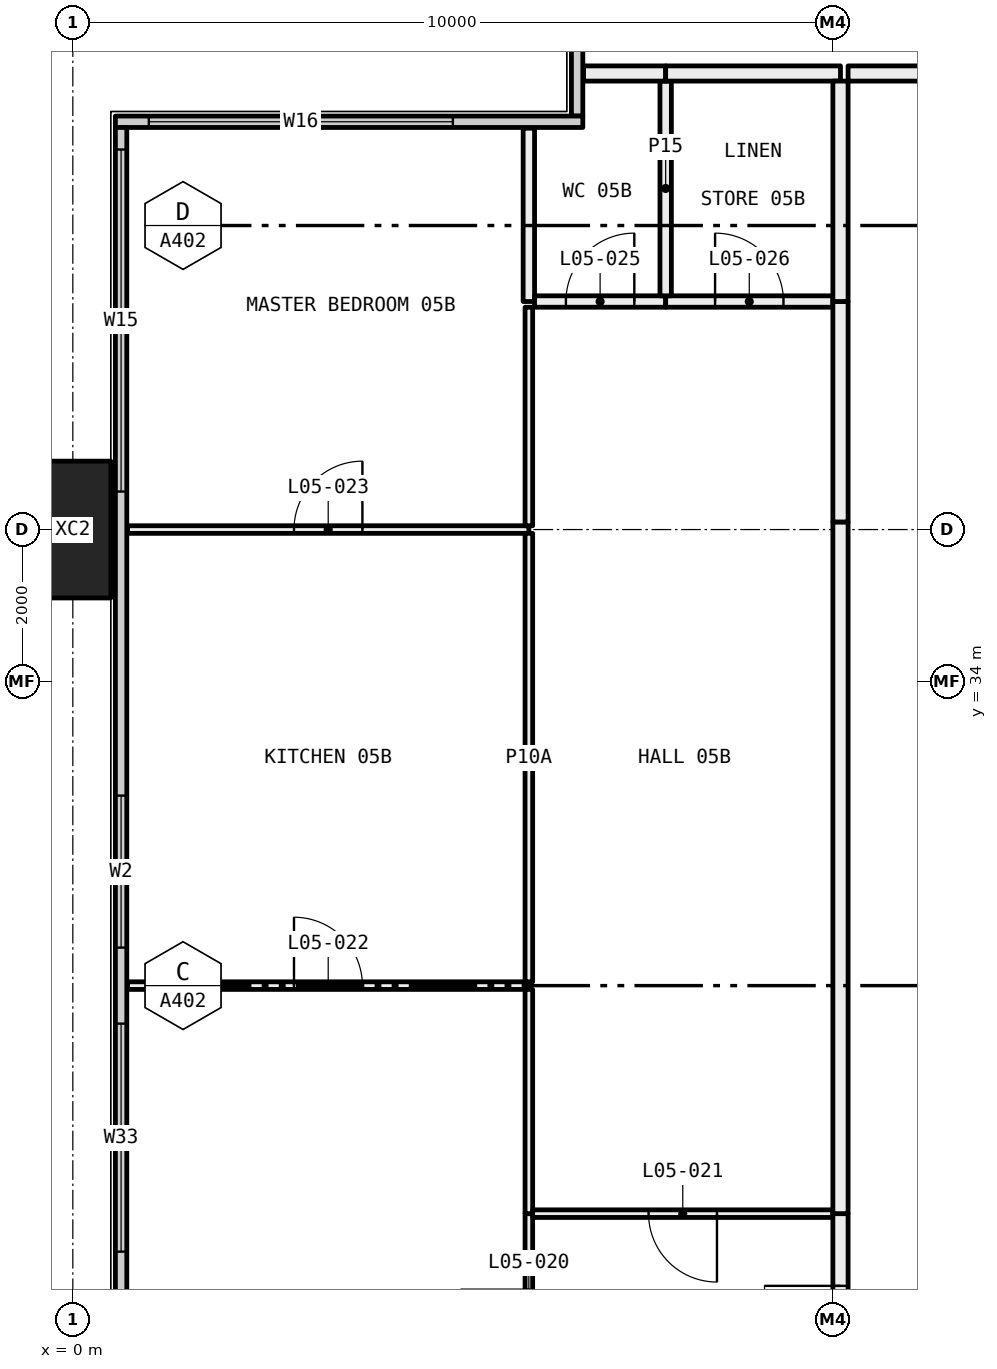
"""IFC4 building model, lengths in metres.
Left out: names, types, materials, properties, quantities, classifications, styles, units other than length and angle.
Written with IfcOpenShell. Run it as: python <this file> out.ifc"""

import sys

from ifc_helpers import new_model, si_unit, direction, frame, frame_2d, origin, origin_2d, place, context, subcontext, project, spatial, rectangle, hollow_rectangle, extrude, element, fill, save


model = new_model("IFC4")
c1 = context("Model", 3, precision=1e-05, world=origin(), true_north=direction((0.0, 1.0)))
c2 = subcontext(c1, "Body", "Model", "MODEL_VIEW")
j1 = project(units=[si_unit("LENGTHUNIT", "METRE"), si_unit("PLANEANGLEUNIT", "RADIAN")], contexts=[c1])
p1 = place(None, origin())
s1 = spatial("IfcSite", under=j1, at=p1, CompositionType="ELEMENT")
p2 = place(p1, origin())
s2 = spatial("IfcBuilding", under=s1, at=p2, CompositionType="ELEMENT")
p3 = place(p2, frame((0.0, 0.0, 30.0)))
s3 = spatial("IfcBuildingStorey", under=s2, at=p3, CompositionType="ELEMENT", Elevation=30.0)
p4 = place(p3, frame((0.0, 36.0, -0.4), z_axis=(0.0, 0.0, 1.0), x_axis=(0.0, 1.0, 0.0)))
e1 = element("IfcColumn", 1, at=p4, inside=s3, PredefinedType="COLUMN", context=c2, shape_type="SweptSolid", body=[
    extrude(hollow_rectangle(XDim=1.8, YDim=1.0, WallThickness=0.07, at=origin_2d()), origin(), (0.0, 0.0, 1.0), 3.45),
])
p5 = place(p3, frame((6.635, 41.44, 0.0), z_axis=(0.0, 0.0, 1.0), x_axis=(0.0, 1.0, 0.0)))
e2 = element("IfcWall", 2, at=p5, inside=s3, PredefinedType="ELEMENTEDWALL", context=c2, shape_type="SweptSolid", body=[
    extrude(rectangle(XDim=5.85, YDim=0.15, at=frame_2d((2.925, 0.0))), origin(), (0.0, 0.0, 1.0), 3.05),
])
p6 = place(p5, frame((1.56, 0.0, 0.45)))
e3 = element("IfcOpeningElement", 3, at=p6, cuts=e2, PredefinedType="OPENING", context=c2, shape_type="SweptSolid", body=[
    extrude(rectangle(XDim=4.0, YDim=2.55, at=frame_2d((2.0, 1.275))), frame((0.0, 0.085, 0.0), z_axis=(0.0, -1.0, 0.0), x_axis=(1.0, 0.0, 0.0)), (0.0, 0.0, 1.0), 0.17),
])
p7 = place(p3, frame((0.56, 41.365, 0.0), z_axis=(0.0, 0.0, 1.0), x_axis=(1.0, 0.0, 0.0)))
e4 = element("IfcWall", 4, at=p7, inside=s3, PredefinedType="ELEMENTEDWALL", context=c2, shape_type="SweptSolid", body=[
    extrude(rectangle(XDim=6.15, YDim=0.15, at=frame_2d((3.075, 0.0))), origin(), (0.0, 0.0, 1.0), 3.05),
])
p8 = place(p7, frame((0.44, 0.0, 0.45)))
e5 = element("IfcOpeningElement", 5, at=p8, cuts=e4, PredefinedType="OPENING", context=c2, shape_type="SweptSolid", body=[
    extrude(rectangle(XDim=4.0, YDim=2.55, at=frame_2d((2.0, 1.275))), frame((0.0, 0.085, 0.0), z_axis=(0.0, -1.0, 0.0), x_axis=(1.0, 0.0, 0.0)), (0.0, 0.0, 1.0), 0.17),
])
p9 = place(p3, frame((0.635, 6.71, 0.0), z_axis=(0.0, 0.0, 1.0), x_axis=(0.0, 1.0, 0.0)))
e6 = element("IfcWall", 6, at=p9, inside=s3, PredefinedType="ELEMENTEDWALL", context=c2, shape_type="SweptSolid", body=[
    extrude(rectangle(XDim=34.58, YDim=0.15, at=frame_2d((17.29, 0.0))), origin(), (0.0, 0.0, 1.0), 3.05),
])
p10 = place(p9, frame((0.29, 0.0, 0.45)))
e7 = element("IfcOpeningElement", 7, at=p10, cuts=e6, PredefinedType="OPENING", context=c2, shape_type="SweptSolid", body=[
    extrude(rectangle(XDim=4.5, YDim=2.55, at=frame_2d((2.25, 1.275))), frame((0.0, 0.085, 0.0), z_axis=(0.0, -1.0, 0.0), x_axis=(1.0, 0.0, 0.0)), (0.0, 0.0, 1.0), 0.17),
])
p11 = place(p9, frame((7.79, 0.0, 0.45)))
e8 = element("IfcOpeningElement", 8, at=p11, cuts=e6, PredefinedType="OPENING", context=c2, shape_type="SweptSolid", body=[
    extrude(rectangle(XDim=3.0, YDim=2.55, at=frame_2d((1.5, 1.275))), frame((0.0, 0.085, 0.0), z_axis=(0.0, -1.0, 0.0), x_axis=(1.0, 0.0, 0.0)), (0.0, 0.0, 1.0), 0.17),
])
p12 = place(p9, frame((11.79, 0.0, 0.45)))
e9 = element("IfcOpeningElement", 9, at=p12, cuts=e6, PredefinedType="OPENING", context=c2, shape_type="SweptSolid", body=[
    extrude(rectangle(XDim=3.0, YDim=2.55, at=frame_2d((1.5, 1.275))), frame((0.0, 0.085, 0.0), z_axis=(0.0, -1.0, 0.0), x_axis=(1.0, 0.0, 0.0)), (0.0, 0.0, 1.0), 0.17),
])
p13 = place(p9, frame((19.79, 0.0, 0.45)))
e10 = element("IfcOpeningElement", 10, at=p13, cuts=e6, PredefinedType="OPENING", context=c2, shape_type="SweptSolid", body=[
    extrude(rectangle(XDim=3.0, YDim=2.55, at=frame_2d((1.5, 1.275))), frame((0.0, 0.085, 0.0), z_axis=(0.0, -1.0, 0.0), x_axis=(1.0, 0.0, 0.0)), (0.0, 0.0, 1.0), 0.17),
])
p14 = place(p9, frame((23.79, 0.0, 0.45)))
e11 = element("IfcOpeningElement", 11, at=p14, cuts=e6, PredefinedType="OPENING", context=c2, shape_type="SweptSolid", body=[
    extrude(rectangle(XDim=2.0, YDim=2.55, at=frame_2d((1.0, 1.275))), frame((0.0, 0.085, 0.0), z_axis=(0.0, -1.0, 0.0), x_axis=(1.0, 0.0, 0.0)), (0.0, 0.0, 1.0), 0.17),
])
p15 = place(p9, frame((29.79, 0.0, 0.45)))
e12 = element("IfcOpeningElement", 12, at=p15, cuts=e6, PredefinedType="OPENING", context=c2, shape_type="SweptSolid", body=[
    extrude(rectangle(XDim=4.5, YDim=2.55, at=frame_2d((2.25, 1.275))), frame((0.0, 0.085, 0.0), z_axis=(0.0, -1.0, 0.0), x_axis=(1.0, 0.0, 0.0)), (0.0, 0.0, 1.0), 0.17),
])
p16 = place(p3, frame((6.0, 30.0, 0.0), z_axis=(0.0, 0.0, 1.0), x_axis=(-1.0, 0.0, 0.0)))
e13 = element("IfcWall", 13, at=p16, inside=s3, PredefinedType="PARTITIONING", context=c2, shape_type="SweptSolid", body=[
    extrude(rectangle(XDim=5.28, YDim=0.1, at=frame_2d((2.64, 0.0))), origin(), (0.0, 0.0, 1.0), 3.05),
])
p17 = place(p16, frame((2.19, 0.0, 0.0)))
e14 = element("IfcOpeningElement", 14, at=p17, cuts=e13, PredefinedType="OPENING", context=c2, shape_type="SweptSolid", body=[
    extrude(rectangle(XDim=0.9, YDim=2.1, at=frame_2d((0.45, 1.05))), frame((0.0, 0.06, 0.0), z_axis=(0.0, -1.0, 0.0), x_axis=(1.0, 0.0, 0.0)), (0.0, 0.0, 1.0), 0.12),
])
p18 = place(p3, frame((6.0, 24.1, 0.0), z_axis=(0.0, 0.0, 1.0), x_axis=(0.0, 1.0, 0.0)))
e15 = element("IfcWall", 15, at=p18, inside=s3, PredefinedType="PARTITIONING", context=c2, shape_type="SweptSolid", body=[
    extrude(rectangle(XDim=2.9, YDim=0.1, at=frame_2d((1.45, 0.0))), origin(), (0.0, 0.0, 1.0), 3.05),
])
p19 = place(p18, frame((1.0, 0.0, 0.0)))
e16 = element("IfcOpeningElement", 16, at=p19, cuts=e15, PredefinedType="OPENING", context=c2, shape_type="SweptSolid", body=[
    extrude(rectangle(XDim=0.9, YDim=2.1, at=frame_2d((0.45, 1.05))), frame((0.0, 0.06, 0.0), z_axis=(0.0, -1.0, 0.0), x_axis=(1.0, 0.0, 0.0)), (0.0, 0.0, 1.0), 0.12),
])
p20 = place(p3, frame((6.0, 27.0, 0.0), z_axis=(0.0, 0.0, 1.0), x_axis=(0.0, 1.0, 0.0)))
e17 = element("IfcWall", 17, at=p20, inside=s3, PredefinedType="PARTITIONING", context=c2, shape_type="SweptSolid", body=[
    extrude(rectangle(XDim=2.95, YDim=0.1, at=frame_2d((1.475, 0.0))), origin(), (0.0, 0.0, 1.0), 3.05),
])
p21 = place(p3, frame((6.0, 36.0, 0.0), z_axis=(0.0, 0.0, 1.0), x_axis=(-1.0, 0.0, 0.0)))
e18 = element("IfcWall", 18, at=p21, inside=s3, PredefinedType="PARTITIONING", context=c2, shape_type="SweptSolid", body=[
    extrude(rectangle(XDim=5.28, YDim=0.1, at=frame_2d((2.64, 0.0))), origin(), (0.0, 0.0, 1.0), 2.45),
])
p22 = place(p21, frame((2.19, 0.0, 0.0)))
e19 = element("IfcOpeningElement", 19, at=p22, cuts=e18, PredefinedType="OPENING", context=c2, shape_type="SweptSolid", body=[
    extrude(rectangle(XDim=0.9, YDim=2.1, at=frame_2d((0.45, 1.05))), frame((0.0, 0.06, 0.0), z_axis=(0.0, -1.0, 0.0), x_axis=(1.0, 0.0, 0.0)), (0.0, 0.0, 1.0), 0.12),
])
p23 = place(p3, frame((6.0, 30.05, 0.0), z_axis=(0.0, 0.0, 1.0), x_axis=(0.0, 1.0, 0.0)))
e20 = element("IfcWall", 20, at=p23, inside=s3, PredefinedType="PARTITIONING", context=c2, shape_type="SweptSolid", body=[
    extrude(rectangle(XDim=5.9, YDim=0.1, at=frame_2d((2.95, 0.0))), origin(), (0.0, 0.0, 1.0), 2.45),
])
p24 = place(p3, frame((6.0, 36.05, 0.0), z_axis=(0.0, 0.0, 1.0), x_axis=(0.0, 1.0, 0.0)))
e21 = element("IfcWall", 21, at=p24, inside=s3, PredefinedType="PARTITIONING", context=c2, shape_type="SweptSolid", body=[
    extrude(rectangle(XDim=2.875, YDim=0.1, at=frame_2d((1.438, 0.0))), origin(), (0.0, 0.0, 1.0), 2.45),
])
p25 = place(p3, frame((6.0, 39.0, 0.0), z_axis=(0.0, 0.0, 1.0), x_axis=(0.0, 1.0, 0.0)))
e22 = element("IfcWall", 22, at=p25, inside=s3, PredefinedType="PARTITIONING", context=c2, shape_type="SweptSolid", body=[
    extrude(rectangle(XDim=2.28, YDim=0.15, at=frame_2d((1.14, 0.0))), origin(), (0.0, 0.0, 1.0), 3.05),
])
p26 = place(p3, frame((10.0, 27.0, 0.0), z_axis=(0.0, 0.0, 1.0), x_axis=(-1.0, 0.0, 0.0)))
e23 = element("IfcWall", 23, at=p26, inside=s3, PredefinedType="PARTITIONING", context=c2, shape_type="SweptSolid", body=[
    extrude(rectangle(XDim=3.95, YDim=0.1, at=frame_2d((1.975, 0.0))), origin(), (0.0, 0.0, 1.0), 3.05),
])
p27 = place(p26, frame((1.525, 0.0, 0.0)))
e24 = element("IfcOpeningElement", 24, at=p27, cuts=e23, PredefinedType="OPENING", context=c2, shape_type="SweptSolid", body=[
    extrude(rectangle(XDim=0.9, YDim=2.1, at=frame_2d((0.45, 1.05))), frame((0.0, 0.06, 0.0), z_axis=(0.0, -1.0, 0.0), x_axis=(1.0, 0.0, 0.0)), (0.0, 0.0, 1.0), 0.12),
])
p28 = place(p3, frame((10.1, 24.1, 0.0), z_axis=(0.0, 0.0, 1.0), x_axis=(0.0, 1.0, 0.0)))
e25 = element("IfcWall", 25, at=p28, inside=s3, PredefinedType="PARTITIONING", context=c2, shape_type="SweptSolid", body=[
    extrude(rectangle(XDim=2.9, YDim=0.2, at=frame_2d((1.45, 0.0))), origin(), (0.0, 0.0, 1.0), 3.05),
])
p29 = place(p28, frame((0.95, 0.0, 0.0)))
e26 = element("IfcOpeningElement", 26, at=p29, cuts=e25, PredefinedType="OPENING", context=c2, shape_type="SweptSolid", body=[
    extrude(rectangle(XDim=1.0, YDim=2.1, at=frame_2d((0.5, 1.05))), frame((0.0, 0.11, 0.0), z_axis=(0.0, -1.0, 0.0), x_axis=(1.0, 0.0, 0.0)), (0.0, 0.0, 1.0), 0.22),
])
p30 = place(p3, frame((7.8, 39.0, 0.0), z_axis=(0.0, 0.0, 1.0), x_axis=(-1.0, 0.0, 0.0)))
e27 = element("IfcWall", 27, at=p30, inside=s3, PredefinedType="PARTITIONING", context=c2, shape_type="SweptSolid", body=[
    extrude(rectangle(XDim=1.725, YDim=0.15, at=frame_2d((0.863, 0.0))), origin(), (0.0, 0.0, 1.0), 3.05),
])
p31 = place(p30, frame((0.413, 0.0, 0.0)))
e28 = element("IfcOpeningElement", 28, at=p31, cuts=e27, PredefinedType="OPENING", context=c2, shape_type="SweptSolid", body=[
    extrude(rectangle(XDim=0.9, YDim=2.1, at=frame_2d((0.45, 1.05))), frame((0.0, 0.085, 0.0), z_axis=(0.0, -1.0, 0.0), x_axis=(1.0, 0.0, 0.0)), (0.0, 0.0, 1.0), 0.17),
])
p32 = place(p3, frame((10.0, 39.0, 0.0), z_axis=(0.0, 0.0, 1.0), x_axis=(-1.0, 0.0, 0.0)))
e29 = element("IfcWall", 29, at=p32, inside=s3, PredefinedType="PARTITIONING", context=c2, shape_type="SweptSolid", body=[
    extrude(rectangle(XDim=2.2, YDim=0.15, at=frame_2d((1.1, 0.0))), origin(), (0.0, 0.0, 1.0), 3.05),
])
p33 = place(p32, frame((0.65, 0.0, 0.0)))
e30 = element("IfcOpeningElement", 30, at=p33, cuts=e29, PredefinedType="OPENING", context=c2, shape_type="SweptSolid", body=[
    extrude(rectangle(XDim=0.9, YDim=2.1, at=frame_2d((0.45, 1.05))), frame((0.0, 0.085, 0.0), z_axis=(0.0, -1.0, 0.0), x_axis=(1.0, 0.0, 0.0)), (0.0, 0.0, 1.0), 0.17),
])
p34 = place(p3, frame((10.1, 27.0, 0.0), z_axis=(0.0, 0.0, 1.0), x_axis=(0.0, 1.0, 0.0)))
e31 = element("IfcWall", 31, at=p34, inside=s3, PredefinedType="PARTITIONING", context=c2, shape_type="SweptSolid", body=[
    extrude(rectangle(XDim=9.1, YDim=0.2, at=frame_2d((4.55, 0.0))), origin(), (0.0, 0.0, 1.0), 2.45),
])
p35 = place(p3, frame((10.1, 36.1, 0.0), z_axis=(0.0, 0.0, 1.0), x_axis=(0.0, 1.0, 0.0)))
e32 = element("IfcWall", 32, at=p35, inside=s3, PredefinedType="PARTITIONING", context=c2, shape_type="SweptSolid", body=[
    extrude(rectangle(XDim=2.9, YDim=0.2, at=frame_2d((1.45, 0.0))), origin(), (0.0, 0.0, 1.0), 3.05),
])
p36 = place(p3, frame((7.8, 39.075, 0.0), z_axis=(0.0, 0.0, 1.0), x_axis=(0.0, 1.0, 0.0)))
e33 = element("IfcWall", 33, at=p36, inside=s3, PredefinedType="PARTITIONING", context=c2, shape_type="SweptSolid", body=[
    extrude(rectangle(XDim=2.825, YDim=0.15, at=frame_2d((1.413, 0.0))), origin(), (0.0, 0.0, 1.0), 3.05),
])
p37 = place(p3, frame((7.8, 42.0, 0.0), z_axis=(0.0, 0.0, 1.0), x_axis=(-1.0, 0.0, 0.0)))
e34 = element("IfcWall", 34, at=p37, inside=s3, PredefinedType="PARTITIONING", context=c2, shape_type="SweptSolid", body=[
    extrude(rectangle(XDim=1.08, YDim=0.2, at=frame_2d((0.54, 0.0))), origin(), (0.0, 0.0, 1.0), 3.05),
])
p38 = place(p3, frame((10.1, 42.0, 0.0), z_axis=(0.0, 0.0, 1.0), x_axis=(-1.0, 0.0, 0.0)))
e35 = element("IfcWall", 35, at=p38, inside=s3, PredefinedType="PARTITIONING", context=c2, shape_type="SweptSolid", body=[
    extrude(rectangle(XDim=2.3, YDim=0.2, at=frame_2d((1.15, 0.0))), origin(), (0.0, 0.0, 1.0), 3.05),
])
p39 = place(p3, frame((10.1, 39.0, 0.0), z_axis=(0.0, 0.0, 1.0), x_axis=(0.0, 1.0, 0.0)))
e36 = element("IfcWall", 36, at=p39, inside=s3, PredefinedType="PARTITIONING", context=c2, shape_type="SweptSolid", body=[
    extrude(rectangle(XDim=2.9, YDim=0.2, at=frame_2d((1.45, 0.0))), origin(), (0.0, 0.0, 1.0), 3.05),
])
p40 = place(p3, frame((10.2, 42.0, 0.0), z_axis=(0.0, 0.0, 1.0), x_axis=(1.0, 0.0, 0.0)))
e37 = element("IfcWall", 37, at=p40, inside=s3, PredefinedType="PARTITIONING", context=c2, shape_type="SweptSolid", body=[
    extrude(rectangle(XDim=1.8, YDim=0.2, at=frame_2d((0.9, 0.0))), origin(), (0.0, 0.0, 1.0), 3.05),
])
p41 = place(p8, origin())
e38 = element("IfcWindow", 38, at=p41, inside=s3, PartitioningType="SINGLE_PANEL", PredefinedType="WINDOW", context=c2, shape_type="SweptSolid", body=[
    extrude(rectangle(XDim=4.0, YDim=2.55, at=frame_2d((2.0, 1.275))), frame((0.0, 0.03, 0.0), z_axis=(0.0, -1.0, 0.0), x_axis=(1.0, 0.0, 0.0)), (0.0, 0.0, 1.0), 0.06),
])
fill(e5, e38)
p42 = place(p13, origin())
e39 = element("IfcWindow", 39, at=p42, inside=s3, PartitioningType="SINGLE_PANEL", PredefinedType="WINDOW", context=c2, shape_type="SweptSolid", body=[
    extrude(rectangle(XDim=3.0, YDim=2.55, at=frame_2d((1.5, 1.275))), frame((0.0, 0.03, 0.0), z_axis=(0.0, -1.0, 0.0), x_axis=(1.0, 0.0, 0.0)), (0.0, 0.0, 1.0), 0.06),
])
fill(e10, e39)
p43 = place(p14, origin())
e40 = element("IfcWindow", 40, at=p43, inside=s3, PartitioningType="SINGLE_PANEL", PredefinedType="WINDOW", context=c2, shape_type="SweptSolid", body=[
    extrude(rectangle(XDim=2.0, YDim=2.55, at=frame_2d((1.0, 1.275))), frame((0.0, 0.03, 0.0), z_axis=(0.0, -1.0, 0.0), x_axis=(1.0, 0.0, 0.0)), (0.0, 0.0, 1.0), 0.06),
])
fill(e11, e40)
p44 = place(p15, origin())
e41 = element("IfcWindow", 41, at=p44, inside=s3, PartitioningType="SINGLE_PANEL", PredefinedType="WINDOW", context=c2, shape_type="SweptSolid", body=[
    extrude(rectangle(XDim=4.5, YDim=2.55, at=frame_2d((2.25, 1.275))), frame((0.0, 0.03, 0.0), z_axis=(0.0, -1.0, 0.0), x_axis=(1.0, 0.0, 0.0)), (0.0, 0.0, 1.0), 0.06),
])
fill(e12, e41)
p45 = place(p29, origin())
e42 = element("IfcDoor", 42, at=p45, inside=s3, OperationType="SINGLE_SWING_LEFT", PredefinedType="DOOR", context=c2, shape_type="SweptSolid", body=[
    extrude(rectangle(XDim=1.0, YDim=2.1, at=frame_2d((0.5, 1.05))), frame((0.0, 0.025, 0.0), z_axis=(0.0, -1.0, 0.0), x_axis=(1.0, 0.0, 0.0)), (0.0, 0.0, 1.0), 0.05),
])
fill(e26, e42)
p46 = place(p27, origin())
e43 = element("IfcDoor", 43, at=p46, inside=s3, OperationType="SINGLE_SWING_RIGHT", PredefinedType="DOOR", context=c2, shape_type="SweptSolid", body=[
    extrude(rectangle(XDim=0.9, YDim=2.1, at=frame_2d((0.45, 1.05))), frame((0.0, 0.025, 0.0), z_axis=(0.0, -1.0, 0.0), x_axis=(1.0, 0.0, 0.0)), (0.0, 0.0, 1.0), 0.05),
])
fill(e24, e43)
p47 = place(p17, frame((0.9, 0.0, 0.0), x_axis=(-1.0, 0.0, 0.0)))
e44 = element("IfcDoor", 44, at=p47, inside=s3, OperationType="SINGLE_SWING_RIGHT", PredefinedType="DOOR", context=c2, shape_type="SweptSolid", body=[
    extrude(rectangle(XDim=0.9, YDim=2.1, at=frame_2d((0.45, 1.05))), frame((0.0, 0.025, 0.0), z_axis=(0.0, -1.0, 0.0), x_axis=(1.0, 0.0, 0.0)), (0.0, 0.0, 1.0), 0.05),
])
fill(e14, e44)
p48 = place(p22, frame((0.9, 0.0, 0.0), x_axis=(-1.0, 0.0, 0.0)))
e45 = element("IfcDoor", 45, at=p48, inside=s3, OperationType="SINGLE_SWING_LEFT", PredefinedType="DOOR", context=c2, shape_type="SweptSolid", body=[
    extrude(rectangle(XDim=0.9, YDim=2.1, at=frame_2d((0.45, 1.05))), frame((0.0, 0.025, 0.0), z_axis=(0.0, -1.0, 0.0), x_axis=(1.0, 0.0, 0.0)), (0.0, 0.0, 1.0), 0.05),
])
fill(e19, e45)
p49 = place(p31, frame((0.9, 0.0, 0.0), x_axis=(-1.0, 0.0, 0.0)))
e46 = element("IfcDoor", 46, at=p49, inside=s3, OperationType="SINGLE_SWING_LEFT", PredefinedType="DOOR", context=c2, shape_type="SweptSolid", body=[
    extrude(rectangle(XDim=0.9, YDim=2.1, at=frame_2d((0.45, 1.05))), frame((0.0, 0.025, 0.0), z_axis=(0.0, -1.0, 0.0), x_axis=(1.0, 0.0, 0.0)), (0.0, 0.0, 1.0), 0.05),
])
fill(e28, e46)
p50 = place(p33, frame((0.9, 0.0, 0.0), x_axis=(-1.0, 0.0, 0.0)))
e47 = element("IfcDoor", 47, at=p50, inside=s3, OperationType="SINGLE_SWING_RIGHT", PredefinedType="DOOR", context=c2, shape_type="SweptSolid", body=[
    extrude(rectangle(XDim=0.9, YDim=2.1, at=frame_2d((0.45, 1.05))), frame((0.0, 0.025, 0.0), z_axis=(0.0, -1.0, 0.0), x_axis=(1.0, 0.0, 0.0)), (0.0, 0.0, 1.0), 0.05),
])
fill(e30, e47)
save(model, sys.argv[1])
